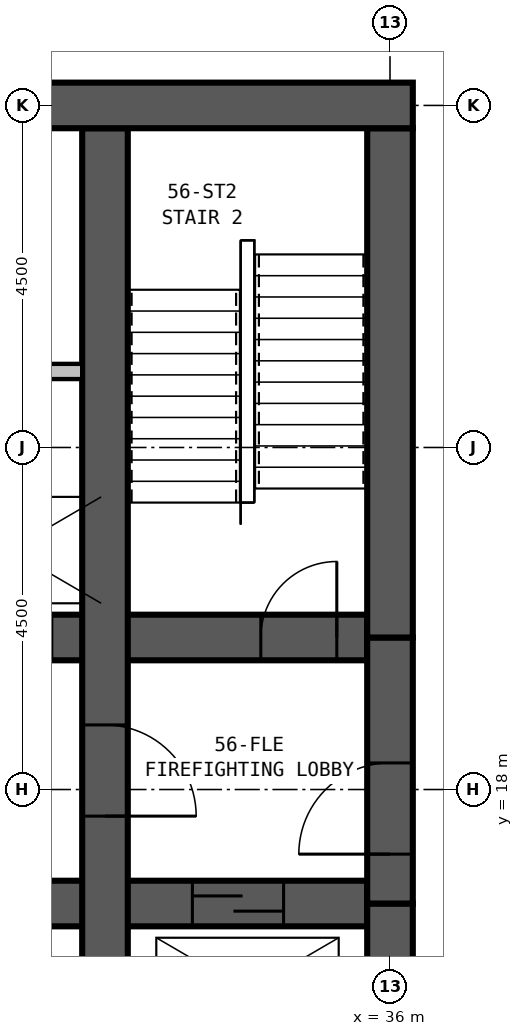
"""IFC4 building model, lengths in metres.
Left out: names, types, materials, properties, quantities, classifications, styles, units other than length and angle.
Written with IfcOpenShell. Run it as: python <this file> out.ifc"""

import sys

from ifc_helpers import new_model, si_unit, direction, frame, frame_2d, origin, place, context, subcontext, project, spatial, rectangle, extrude, element, fill, save


model = new_model("IFC4")
c1 = context("Model", 3, precision=1e-05, world=origin(), true_north=direction((0.0, 1.0)))
c2 = subcontext(c1, "Body", "Model", "MODEL_VIEW")
j1 = project(units=[si_unit("LENGTHUNIT", "METRE"), si_unit("PLANEANGLEUNIT", "RADIAN")], contexts=[c1])
p1 = place(None, origin())
s1 = spatial("IfcSite", under=j1, at=p1, CompositionType="ELEMENT")
p2 = place(p1, origin())
s2 = spatial("IfcBuilding", under=s1, at=p2, CompositionType="ELEMENT")
p3 = place(p2, frame((0.0, 0.0, 217.4)))
s3 = spatial("IfcBuildingStorey", under=s2, at=p3, CompositionType="ELEMENT", Elevation=217.4)
p4 = place(p3, frame((36.3, 27.0, 0.0), z_axis=(0.0, 0.0, 1.0), x_axis=(-1.0, 0.0, 0.0)))
e1 = element("IfcWall", 1, at=p4, inside=s3, PredefinedType="SHEAR", context=c2, shape_type="SweptSolid", body=[
    extrude(rectangle(XDim=23.35, YDim=0.6, at=frame_2d((11.675, 0.0))), origin(), (0.0, 0.0, 1.0), 3.9),
])
p5 = place(p4, frame((17.05, 0.0, 0.0)))
e2 = element("IfcOpeningElement", 2, at=p5, cuts=e1, PredefinedType="OPENING", context=c2, shape_type="SweptSolid", body=[
    extrude(rectangle(XDim=1.0, YDim=2.1, at=frame_2d((0.5, 1.05))), frame((0.0, 0.31, 0.0), z_axis=(0.0, -1.0, 0.0), x_axis=(1.0, 0.0, 0.0)), (0.0, 0.0, 1.0), 0.62),
])
p6 = place(p4, frame((12.05, 0.0, 0.0)))
e3 = element("IfcOpeningElement", 3, at=p6, cuts=e1, PredefinedType="OPENING", context=c2, shape_type="SweptSolid", body=[
    extrude(rectangle(XDim=1.0, YDim=2.1, at=frame_2d((0.5, 1.05))), frame((0.0, 0.31, 0.0), z_axis=(0.0, -1.0, 0.0), x_axis=(1.0, 0.0, 0.0)), (0.0, 0.0, 1.0), 0.62),
])
p7 = place(p4, frame((7.05, 0.0, 0.0)))
e4 = element("IfcOpeningElement", 4, at=p7, cuts=e1, PredefinedType="OPENING", context=c2, shape_type="SweptSolid", body=[
    extrude(rectangle(XDim=1.0, YDim=2.1, at=frame_2d((0.5, 1.05))), frame((0.0, 0.31, 0.0), z_axis=(0.0, -1.0, 0.0), x_axis=(1.0, 0.0, 0.0)), (0.0, 0.0, 1.0), 0.62),
])
p8 = place(p3, frame((32.25, 13.8, 0.0), z_axis=(0.0, 0.0, 1.0), x_axis=(0.0, 1.0, 0.0)))
e5 = element("IfcWall", 5, at=p8, inside=s3, PredefinedType="SHEAR", context=c2, shape_type="SweptSolid", body=[
    extrude(rectangle(XDim=12.9, YDim=0.6, at=frame_2d((6.45, 0.0))), origin(), (0.0, 0.0, 1.0), 3.9),
])
p9 = place(p8, frame((5.05, 0.0, 0.0), z_axis=(0.0, 0.0, 1.0), x_axis=(-1.0, 0.0, 0.0)))
e6 = element("IfcOpeningElement", 6, at=p9, cuts=e5, PredefinedType="OPENING", context=c2, shape_type="SweptSolid", body=[
    extrude(rectangle(XDim=1.2, YDim=2.1, at=frame_2d((0.6, 1.05))), frame((0.0, 0.31, 0.0), z_axis=(0.0, -1.0, 0.0), x_axis=(1.0, 0.0, 0.0)), (0.0, 0.0, 1.0), 0.62),
])
p10 = place(p3, frame((13.8, 16.5, 0.0), z_axis=(0.0, 0.0, 1.0), x_axis=(1.0, 0.0, 0.0)))
e7 = element("IfcWall", 7, at=p10, inside=s3, PredefinedType="SHEAR", context=c2, shape_type="SweptSolid", body=[
    extrude(rectangle(XDim=21.9, YDim=0.6, at=frame_2d((10.95, 0.0))), origin(), (0.0, 0.0, 1.0), 3.9),
])
p11 = place(p10, frame((5.75, 0.0, 0.0), z_axis=(0.0, 0.0, 1.0), x_axis=(-1.0, 0.0, 0.0)))
e8 = element("IfcOpeningElement", 8, at=p11, cuts=e7, PredefinedType="OPENING", context=c2, shape_type="SweptSolid", body=[
    extrude(rectangle(XDim=1.0, YDim=2.1, at=frame_2d((0.5, 1.05))), frame((0.0, 0.31, 0.0), z_axis=(0.0, -1.0, 0.0), x_axis=(1.0, 0.0, 0.0)), (0.0, 0.0, 1.0), 0.62),
])
p12 = place(p10, frame((10.2, 0.0, 0.0), z_axis=(0.0, 0.0, 1.0), x_axis=(-1.0, 0.0, 0.0)))
e9 = element("IfcOpeningElement", 9, at=p12, cuts=e7, PredefinedType="OPENING", context=c2, shape_type="SweptSolid", body=[
    extrude(rectangle(XDim=1.0, YDim=2.1, at=frame_2d((0.5, 1.05))), frame((0.0, 0.31, 0.0), z_axis=(0.0, -1.0, 0.0), x_axis=(1.0, 0.0, 0.0)), (0.0, 0.0, 1.0), 0.62),
])
p13 = place(p10, frame((12.7, 0.0, 0.0), z_axis=(0.0, 0.0, 1.0), x_axis=(-1.0, 0.0, 0.0)))
e10 = element("IfcOpeningElement", 10, at=p13, cuts=e7, PredefinedType="OPENING", context=c2, shape_type="SweptSolid", body=[
    extrude(rectangle(XDim=1.0, YDim=2.1, at=frame_2d((0.5, 1.05))), frame((0.0, 0.31, 0.0), z_axis=(0.0, -1.0, 0.0), x_axis=(1.0, 0.0, 0.0)), (0.0, 0.0, 1.0), 0.62),
])
p14 = place(p10, frame((17.15, 0.0, 0.0), z_axis=(0.0, 0.0, 1.0), x_axis=(-1.0, 0.0, 0.0)))
e11 = element("IfcOpeningElement", 11, at=p14, cuts=e7, PredefinedType="OPENING", context=c2, shape_type="SweptSolid", body=[
    extrude(rectangle(XDim=1.0, YDim=2.1, at=frame_2d((0.5, 1.05))), frame((0.0, 0.31, 0.0), z_axis=(0.0, -1.0, 0.0), x_axis=(1.0, 0.0, 0.0)), (0.0, 0.0, 1.0), 0.62),
])
p15 = place(p10, frame((0.6, 0.0, 0.0)))
e12 = element("IfcOpeningElement", 12, at=p15, cuts=e7, PredefinedType="OPENING", context=c2, shape_type="SweptSolid", body=[
    extrude(rectangle(XDim=1.2, YDim=2.1, at=frame_2d((0.6, 1.05))), frame((0.0, 0.31, 0.0), z_axis=(0.0, -1.0, 0.0), x_axis=(1.0, 0.0, 0.0)), (0.0, 0.0, 1.0), 0.62),
])
p16 = place(p10, frame((19.6, 0.0, 0.0)))
e13 = element("IfcOpeningElement", 13, at=p16, cuts=e7, PredefinedType="OPENING", context=c2, shape_type="SweptSolid", body=[
    extrude(rectangle(XDim=1.2, YDim=2.1, at=frame_2d((0.6, 1.05))), frame((0.0, 0.31, 0.0), z_axis=(0.0, -1.0, 0.0), x_axis=(1.0, 0.0, 0.0)), (0.0, 0.0, 1.0), 0.62),
])
p17 = place(p3, frame((13.8, 20.0, 0.0), z_axis=(0.0, 0.0, 1.0), x_axis=(1.0, 0.0, 0.0)))
e14 = element("IfcWall", 14, at=p17, inside=s3, PredefinedType="SHEAR", context=c2, shape_type="SweptSolid", body=[
    extrude(rectangle(XDim=21.9, YDim=0.6, at=frame_2d((10.95, 0.0))), origin(), (0.0, 0.0, 1.0), 3.9),
])
p18 = place(p17, frame((0.5, 0.0, 0.0)))
e15 = element("IfcOpeningElement", 15, at=p18, cuts=e14, PredefinedType="OPENING", context=c2, shape_type="SweptSolid", body=[
    extrude(rectangle(XDim=1.0, YDim=2.1, at=frame_2d((0.5, 1.05))), frame((0.0, 0.31, 0.0), z_axis=(0.0, -1.0, 0.0), x_axis=(1.0, 0.0, 0.0)), (0.0, 0.0, 1.0), 0.62),
])
p19 = place(p17, frame((20.5, 0.0, 0.0)))
e16 = element("IfcOpeningElement", 16, at=p19, cuts=e14, PredefinedType="OPENING", context=c2, shape_type="SweptSolid", body=[
    extrude(rectangle(XDim=1.0, YDim=2.1, at=frame_2d((0.5, 1.05))), frame((0.0, 0.31, 0.0), z_axis=(0.0, -1.0, 0.0), x_axis=(1.0, 0.0, 0.0)), (0.0, 0.0, 1.0), 0.62),
])
p20 = place(p17, frame((9.15, 0.0, 0.0)))
e17 = element("IfcOpeningElement", 17, at=p20, cuts=e14, PredefinedType="OPENING", context=c2, shape_type="SweptSolid", body=[
    extrude(rectangle(XDim=1.1, YDim=2.1, at=frame_2d((0.55, 1.05))), frame((0.0, 0.31, 0.0), z_axis=(0.0, -1.0, 0.0), x_axis=(1.0, 0.0, 0.0)), (0.0, 0.0, 1.0), 0.62),
])
p21 = place(p17, frame((11.65, 0.0, 0.0)))
e18 = element("IfcOpeningElement", 18, at=p21, cuts=e14, PredefinedType="OPENING", context=c2, shape_type="SweptSolid", body=[
    extrude(rectangle(XDim=1.1, YDim=2.1, at=frame_2d((0.55, 1.05))), frame((0.0, 0.31, 0.0), z_axis=(0.0, -1.0, 0.0), x_axis=(1.0, 0.0, 0.0)), (0.0, 0.0, 1.0), 0.62),
])
p22 = place(p17, frame((14.15, 0.0, 0.0)))
e19 = element("IfcOpeningElement", 19, at=p22, cuts=e14, PredefinedType="OPENING", context=c2, shape_type="SweptSolid", body=[
    extrude(rectangle(XDim=1.1, YDim=2.1, at=frame_2d((0.55, 1.05))), frame((0.0, 0.31, 0.0), z_axis=(0.0, -1.0, 0.0), x_axis=(1.0, 0.0, 0.0)), (0.0, 0.0, 1.0), 0.62),
])
p23 = place(p17, frame((16.65, 0.0, 0.0)))
e20 = element("IfcOpeningElement", 20, at=p23, cuts=e14, PredefinedType="OPENING", context=c2, shape_type="SweptSolid", body=[
    extrude(rectangle(XDim=1.1, YDim=2.1, at=frame_2d((0.55, 1.05))), frame((0.0, 0.31, 0.0), z_axis=(0.0, -1.0, 0.0), x_axis=(1.0, 0.0, 0.0)), (0.0, 0.0, 1.0), 0.62),
])
p24 = place(p17, frame((5.75, 0.0, 0.0), z_axis=(0.0, 0.0, 1.0), x_axis=(-1.0, 0.0, 0.0)))
e21 = element("IfcOpeningElement", 21, at=p24, cuts=e14, PredefinedType="OPENING", context=c2, shape_type="SweptSolid", body=[
    extrude(rectangle(XDim=1.0, YDim=2.1, at=frame_2d((0.5, 1.05))), frame((0.0, 0.31, 0.0), z_axis=(0.0, -1.0, 0.0), x_axis=(1.0, 0.0, 0.0)), (0.0, 0.0, 1.0), 0.62),
])
p25 = place(p17, frame((6.7, 0.0, 0.0)))
e22 = element("IfcOpeningElement", 22, at=p25, cuts=e14, PredefinedType="OPENING", context=c2, shape_type="SweptSolid", body=[
    extrude(rectangle(XDim=1.0, YDim=2.1, at=frame_2d((0.5, 1.05))), frame((0.0, 0.31, 0.0), z_axis=(0.0, -1.0, 0.0), x_axis=(1.0, 0.0, 0.0)), (0.0, 0.0, 1.0), 0.62),
])
p26 = place(p3, frame((36.0, 13.8, 0.0), z_axis=(0.0, 0.0, 1.0), x_axis=(0.0, 1.0, 0.0)))
e23 = element("IfcWall", 23, at=p26, inside=s3, PredefinedType="SHEAR", context=c2, shape_type="SweptSolid", body=[
    extrude(rectangle(XDim=2.7, YDim=0.6, at=frame_2d((1.35, 0.0))), origin(), (0.0, 0.0, 1.0), 3.9),
])
p27 = place(p3, frame((36.0, 16.5, 0.0), z_axis=(0.0, 0.0, 1.0), x_axis=(0.0, 1.0, 0.0)))
e24 = element("IfcWall", 24, at=p27, inside=s3, PredefinedType="SHEAR", context=c2, shape_type="SweptSolid", body=[
    extrude(rectangle(XDim=3.5, YDim=0.6, at=frame_2d((1.75, 0.0))), origin(), (0.0, 0.0, 1.0), 3.9),
])
p28 = place(p27, frame((0.65, 0.0, 0.0)))
e25 = element("IfcOpeningElement", 25, at=p28, cuts=e24, PredefinedType="OPENING", context=c2, shape_type="SweptSolid", body=[
    extrude(rectangle(XDim=1.2, YDim=2.1, at=frame_2d((0.6, 1.05))), frame((0.0, 0.31, 0.0), z_axis=(0.0, -1.0, 0.0), x_axis=(1.0, 0.0, 0.0)), (0.0, 0.0, 1.0), 0.62),
])
p29 = place(p3, frame((36.0, 20.0, 0.0), z_axis=(0.0, 0.0, 1.0), x_axis=(0.0, 1.0, 0.0)))
e26 = element("IfcWall", 26, at=p29, inside=s3, PredefinedType="SHEAR", context=c2, shape_type="SweptSolid", body=[
    extrude(rectangle(XDim=6.7, YDim=0.6, at=frame_2d((3.35, 0.0))), origin(), (0.0, 0.0, 1.0), 3.9),
])
p30 = place(p3, frame((17.55, 23.5, 0.0), z_axis=(0.0, 0.0, 1.0), x_axis=(1.0, 0.0, 0.0)))
e27 = element("IfcWall", 27, at=p30, inside=s3, PredefinedType="PARTITIONING", context=c2, shape_type="SweptSolid", body=[
    extrude(rectangle(XDim=14.4, YDim=0.2, at=frame_2d((7.2, 0.0))), origin(), (0.0, 0.0, 1.0), 3.65),
])
p31 = place(p30, frame((0.45, 0.0, 0.0)))
e28 = element("IfcOpeningElement", 28, at=p31, cuts=e27, PredefinedType="OPENING", context=c2, shape_type="SweptSolid", body=[
    extrude(rectangle(XDim=1.0, YDim=2.1, at=frame_2d((0.5, 1.05))), frame((0.0, 0.11, 0.0), z_axis=(0.0, -1.0, 0.0), x_axis=(1.0, 0.0, 0.0)), (0.0, 0.0, 1.0), 0.22),
])
p32 = place(p28, origin())
e29 = element("IfcDoor", 29, at=p32, inside=s3, OperationType="SINGLE_SWING_LEFT", PredefinedType="DOOR", context=c2, shape_type="SweptSolid", body=[
    extrude(rectangle(XDim=1.2, YDim=2.1, at=frame_2d((0.6, 1.05))), frame((0.0, 0.3, 0.0), z_axis=(0.0, -1.0, 0.0), x_axis=(1.0, 0.0, 0.0)), (0.0, 0.0, 1.0), 0.6),
])
fill(e25, e29)
p33 = place(p9, origin())
e30 = element("IfcDoor", 30, at=p33, inside=s3, OperationType="SINGLE_SWING_RIGHT", PredefinedType="DOOR", context=c2, shape_type="SweptSolid", body=[
    extrude(rectangle(XDim=1.2, YDim=2.1, at=frame_2d((0.6, 1.05))), frame((0.0, 0.3, 0.0), z_axis=(0.0, -1.0, 0.0), x_axis=(1.0, 0.0, 0.0)), (0.0, 0.0, 1.0), 0.6),
])
fill(e6, e30)
p34 = place(p19, origin())
e31 = element("IfcDoor", 31, at=p34, inside=s3, OperationType="SINGLE_SWING_RIGHT", PredefinedType="DOOR", context=c2, shape_type="SweptSolid", body=[
    extrude(rectangle(XDim=1.0, YDim=2.1, at=frame_2d((0.5, 1.05))), frame((0.0, 0.3, 0.0), z_axis=(0.0, -1.0, 0.0), x_axis=(1.0, 0.0, 0.0)), (0.0, 0.0, 1.0), 0.6),
])
fill(e16, e31)
p35 = place(p16, origin())
e32 = element("IfcDoor", 32, at=p35, inside=s3, OperationType="SLIDING_TO_LEFT", PredefinedType="DOOR", context=c2, shape_type="SweptSolid", body=[
    extrude(rectangle(XDim=1.2, YDim=2.1, at=frame_2d((0.6, 1.05))), frame((0.0, 0.3, 0.0), z_axis=(0.0, -1.0, 0.0), x_axis=(1.0, 0.0, 0.0)), (0.0, 0.0, 1.0), 0.6),
])
fill(e13, e32)
save(model, sys.argv[1])
